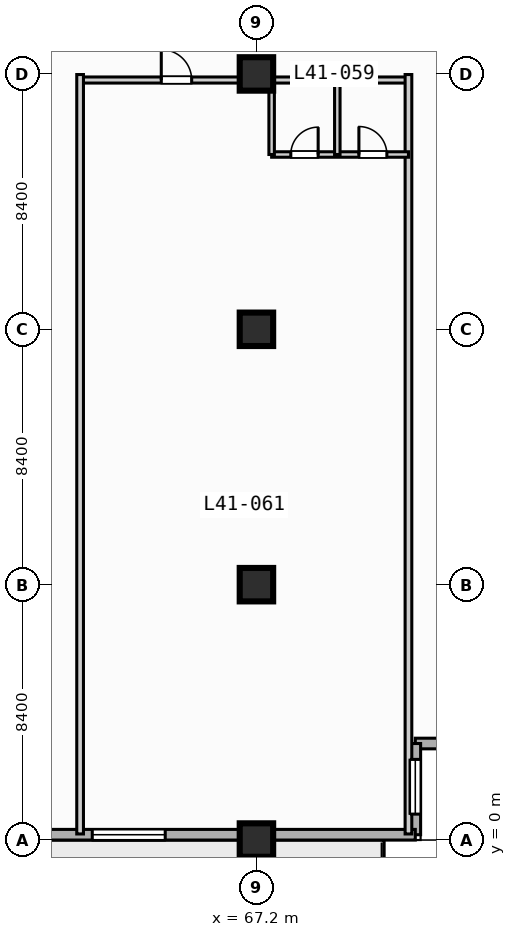
"""IFC4 building model, lengths in metres.
Left out: names, types, materials, properties, quantities, classifications, styles, units other than length and angle.
Written with IfcOpenShell. Run it as: python <this file> out.ifc"""

import sys

from ifc_helpers import new_model, si_unit, direction, frame, frame_2d, origin, origin_2d, place, context, subcontext, project, spatial, rectangle, extrude, element, fill, save


model = new_model("IFC4")
c1 = context("Model", 3, precision=1e-05, world=origin(), true_north=direction((0.0, 1.0)))
c2 = subcontext(c1, "Body", "Model", "MODEL_VIEW")
j1 = project(units=[si_unit("LENGTHUNIT", "METRE"), si_unit("PLANEANGLEUNIT", "RADIAN")], contexts=[c1])
p1 = place(None, origin())
s1 = spatial("IfcSite", under=j1, at=p1, CompositionType="ELEMENT")
p2 = place(p1, origin())
s2 = spatial("IfcBuilding", under=s1, at=p2, CompositionType="ELEMENT")
p3 = place(p2, frame((0.0, 0.0, 171.7)))
s3 = spatial("IfcBuildingStorey", under=s2, at=p3, CompositionType="ELEMENT", Elevation=171.7)
for number, where, z_axis, x_axis in (
    (1, (67.2, 0.0, 0.0), (0.0, 0.0, 1.0), (1.0, 0.0, 0.0)),
    (2, (67.2, 8.4, 0.0), (0.0, 0.0, 1.0), (1.0, 0.0, 0.0)),
    (3, (67.2, 16.8, 0.0), (0.0, 0.0, 1.0), (1.0, 0.0, 0.0)),
    (4, (67.2, 25.2, 0.0), (0.0, 0.0, 1.0), (1.0, 0.0, 0.0)),
):
    element("IfcColumn", number, at=place(p3, frame(where, z_axis=z_axis, x_axis=x_axis)), inside=s3, PredefinedType="COLUMN", context=c2, shape_type="SweptSolid", body=[
        extrude(rectangle(XDim=1.1, YDim=1.1, at=origin_2d()), origin(), (0.0, 0.0, 1.0), 3.7),
    ])
p4 = place(p3, frame((75.425, 3.175, 0.0), z_axis=(0.0, 0.0, 1.0), x_axis=(-1.0, 0.0, 0.0)))
e5 = element("IfcWall", 5, at=p4, inside=s3, PredefinedType="STANDARD", context=c2, shape_type="SweptSolid", body=[
    extrude(rectangle(XDim=3.0, YDim=0.35, at=frame_2d((1.5, 0.0))), origin(), (0.0, 0.0, 1.0), 3.47),
])
p5 = place(p3, frame((72.425, 3.175, 0.0), z_axis=(0.0, 0.0, 1.0), x_axis=(0.0, -1.0, 0.0)))
e6 = element("IfcWall", 6, at=p5, inside=s3, PredefinedType="STANDARD", context=c2, shape_type="SweptSolid", body=[
    extrude(rectangle(XDim=3.0, YDim=0.35, at=frame_2d((1.5, 0.0))), origin(), (0.0, 0.0, 1.0), 3.47),
])
p6 = place(p5, frame((0.522, 0.0, 0.85)))
e7 = element("IfcOpeningElement", 7, at=p6, cuts=e6, PredefinedType="OPENING", context=c2, shape_type="SweptSolid", body=[
    extrude(rectangle(XDim=1.8, YDim=1.8, at=frame_2d((0.9, 0.9))), frame((0.0, 0.185, 0.0), z_axis=(0.0, -1.0, 0.0), x_axis=(1.0, 0.0, 0.0)), (0.0, 0.0, 1.0), 0.37),
])
p7 = place(p3, frame((72.425, 0.175, 0.0), z_axis=(0.0, 0.0, 1.0), x_axis=(-1.0, 0.0, 0.0)))
e8 = element("IfcWall", 8, at=p7, inside=s3, PredefinedType="STANDARD", context=c2, shape_type="SweptSolid", body=[
    extrude(rectangle(XDim=69.25, YDim=0.35, at=frame_2d((34.625, 0.0))), origin(), (0.0, 0.0, 1.0), 3.47),
])
p8 = place(p7, frame((51.725, 0.0, 0.0)))
e9 = element("IfcOpeningElement", 9, at=p8, cuts=e8, PredefinedType="OPENING", context=c2, shape_type="SweptSolid", body=[
    extrude(rectangle(XDim=1.4, YDim=2.2, at=frame_2d((0.7, 1.1))), frame((0.0, 0.185, 0.0), z_axis=(0.0, -1.0, 0.0), x_axis=(1.0, 0.0, 0.0)), (0.0, 0.0, 1.0), 0.37),
])
p9 = place(p7, frame((33.725, 0.0, 0.85)))
e10 = element("IfcOpeningElement", 10, at=p9, cuts=e8, PredefinedType="OPENING", context=c2, shape_type="SweptSolid", body=[
    extrude(rectangle(XDim=1.8, YDim=1.8, at=frame_2d((0.9, 0.9))), frame((0.0, 0.185, 0.0), z_axis=(0.0, -1.0, 0.0), x_axis=(1.0, 0.0, 0.0)), (0.0, 0.0, 1.0), 0.37),
])
p10 = place(p7, frame((25.025, 0.0, 0.85)))
e11 = element("IfcOpeningElement", 11, at=p10, cuts=e8, PredefinedType="OPENING", context=c2, shape_type="SweptSolid", body=[
    extrude(rectangle(XDim=2.4, YDim=1.95, at=frame_2d((1.2, 0.975))), frame((0.0, 0.185, 0.0), z_axis=(0.0, -1.0, 0.0), x_axis=(1.0, 0.0, 0.0)), (0.0, 0.0, 1.0), 0.37),
])
p11 = place(p7, frame((8.225, 0.0, 0.85)))
e12 = element("IfcOpeningElement", 12, at=p11, cuts=e8, PredefinedType="OPENING", context=c2, shape_type="SweptSolid", body=[
    extrude(rectangle(XDim=2.4, YDim=1.95, at=frame_2d((1.2, 0.975))), frame((0.0, 0.185, 0.0), z_axis=(0.0, -1.0, 0.0), x_axis=(1.0, 0.0, 0.0)), (0.0, 0.0, 1.0), 0.37),
])
p12 = place(p7, frame((64.725, 0.0, 0.85)))
e13 = element("IfcOpeningElement", 13, at=p12, cuts=e8, PredefinedType="OPENING", context=c2, shape_type="SweptSolid", body=[
    extrude(rectangle(XDim=1.8, YDim=1.8, at=frame_2d((0.9, 0.9))), frame((0.0, 0.185, 0.0), z_axis=(0.0, -1.0, 0.0), x_axis=(1.0, 0.0, 0.0)), (0.0, 0.0, 1.0), 0.37),
])
p13 = place(p7, frame((44.675, 0.0, 0.85)))
e14 = element("IfcOpeningElement", 14, at=p13, cuts=e8, PredefinedType="OPENING", context=c2, shape_type="SweptSolid", body=[
    extrude(rectangle(XDim=1.8, YDim=1.8, at=frame_2d((0.9, 0.9))), frame((0.0, 0.185, 0.0), z_axis=(0.0, -1.0, 0.0), x_axis=(1.0, 0.0, 0.0)), (0.0, 0.0, 1.0), 0.37),
])
p14 = place(p3, frame((61.4, 25.0, 0.0), z_axis=(0.0, 0.0, 1.0), x_axis=(1.0, 0.0, 0.0)))
e15 = element("IfcWall", 15, at=p14, inside=s3, PredefinedType="PARTITIONING", context=c2, shape_type="SweptSolid", body=[
    extrude(rectangle(XDim=10.8, YDim=0.2, at=frame_2d((5.4, 0.0))), origin(), (0.0, 0.0, 1.0), 2.82),
])
p15 = place(p14, frame((2.67, 0.0, 0.0)))
e16 = element("IfcOpeningElement", 16, at=p15, cuts=e15, PredefinedType="OPENING", context=c2, shape_type="SweptSolid", body=[
    extrude(rectangle(XDim=1.0, YDim=2.15, at=frame_2d((0.5, 1.075))), frame((0.0, 0.11, 0.0), z_axis=(0.0, -1.0, 0.0), x_axis=(1.0, 0.0, 0.0)), (0.0, 0.0, 1.0), 0.22),
])
for number, where, z_axis, x_axis in (
    (17, (61.4, 0.2, 0.0), (0.0, 0.0, 1.0), (0.0, 1.0, 0.0)),
    (18, (72.2, 0.2, 0.0), (0.0, 0.0, 1.0), (0.0, 1.0, 0.0)),
):
    element("IfcWall", number, at=place(p3, frame(where, z_axis=z_axis, x_axis=x_axis)), inside=s3, PredefinedType="PARTITIONING", context=c2, shape_type="SweptSolid", body=[
        extrude(rectangle(XDim=24.98, YDim=0.22, at=frame_2d((12.49, 0.0))), origin(), (0.0, 0.0, 1.0), 3.47),
    ])
p16 = place(p3, frame((67.7, 22.55, 0.0), z_axis=(0.0, 0.0, 1.0), x_axis=(1.0, 0.0, 0.0)))
e19 = element("IfcWall", 19, at=p16, inside=s3, PredefinedType="PLUMBINGWALL", context=c2, shape_type="SweptSolid", body=[
    extrude(rectangle(XDim=4.5, YDim=0.18, at=frame_2d((2.25, 0.0))), origin(), (0.0, 0.0, 1.0), 3.47),
])
p17 = place(p16, frame((0.63, 0.0, 0.0)))
e20 = element("IfcOpeningElement", 20, at=p17, cuts=e19, PredefinedType="OPENING", context=c2, shape_type="SweptSolid", body=[
    extrude(rectangle(XDim=0.9, YDim=2.1, at=frame_2d((0.45, 1.05))), frame((0.0, 0.1, 0.0), z_axis=(0.0, -1.0, 0.0), x_axis=(1.0, 0.0, 0.0)), (0.0, 0.0, 1.0), 0.2),
])
p18 = place(p16, frame((2.87, 0.0, 0.0)))
e21 = element("IfcOpeningElement", 21, at=p18, cuts=e19, PredefinedType="OPENING", context=c2, shape_type="SweptSolid", body=[
    extrude(rectangle(XDim=0.92, YDim=2.1, at=frame_2d((0.46, 1.05))), frame((0.0, 0.1, 0.0), z_axis=(0.0, -1.0, 0.0), x_axis=(1.0, 0.0, 0.0)), (0.0, 0.0, 1.0), 0.2),
])
for number, where, z_axis, x_axis in (
    (22, (67.7, 22.55, 0.0), (0.0, 0.0, 1.0), (0.0, 1.0, 0.0)),
    (23, (69.86, 22.55, 0.0), (0.0, 0.0, 1.0), (0.0, 1.0, 0.0)),
):
    element("IfcWall", number, at=place(p3, frame(where, z_axis=z_axis, x_axis=x_axis)), inside=s3, PredefinedType="PLUMBINGWALL", context=c2, shape_type="SweptSolid", body=[
        extrude(rectangle(XDim=2.45, YDim=0.18, at=frame_2d((1.225, 0.0))), origin(), (0.0, 0.0, 1.0), 3.47),
    ])
p19 = place(p6, origin())
e24 = element("IfcWindow", 24, at=p19, inside=s3, PartitioningType="SINGLE_PANEL", PredefinedType="WINDOW", context=c2, shape_type="SweptSolid", body=[
    extrude(rectangle(XDim=1.8, YDim=1.8, at=frame_2d((0.9, 0.9))), frame((0.0, 0.03, 0.0), z_axis=(0.0, -1.0, 0.0), x_axis=(1.0, 0.0, 0.0)), (0.0, 0.0, 1.0), 0.06),
])
fill(e7, e24)
p20 = place(p11, origin())
e25 = element("IfcWindow", 25, at=p20, inside=s3, PartitioningType="SINGLE_PANEL", PredefinedType="WINDOW", context=c2, shape_type="SweptSolid", body=[
    extrude(rectangle(XDim=2.4, YDim=1.95, at=frame_2d((1.2, 0.975))), frame((0.0, 0.03, 0.0), z_axis=(0.0, -1.0, 0.0), x_axis=(1.0, 0.0, 0.0)), (0.0, 0.0, 1.0), 0.06),
])
fill(e12, e25)
p21 = place(p15, origin())
e26 = element("IfcDoor", 26, at=p21, inside=s3, OperationType="SINGLE_SWING_LEFT", PredefinedType="DOOR", context=c2, shape_type="SweptSolid", body=[
    extrude(rectangle(XDim=1.0, YDim=2.15, at=frame_2d((0.5, 1.075))), frame((0.0, 0.025, 0.0), z_axis=(0.0, -1.0, 0.0), x_axis=(1.0, 0.0, 0.0)), (0.0, 0.0, 1.0), 0.05),
])
fill(e16, e26)
p22 = place(p17, origin())
e27 = element("IfcDoor", 27, at=p22, inside=s3, OperationType="SINGLE_SWING_RIGHT", PredefinedType="DOOR", context=c2, shape_type="SweptSolid", body=[
    extrude(rectangle(XDim=0.9, YDim=2.1, at=frame_2d((0.45, 1.05))), frame((0.0, 0.025, 0.0), z_axis=(0.0, -1.0, 0.0), x_axis=(1.0, 0.0, 0.0)), (0.0, 0.0, 1.0), 0.05),
])
fill(e20, e27)
p23 = place(p18, origin())
e28 = element("IfcDoor", 28, at=p23, inside=s3, OperationType="SINGLE_SWING_LEFT", PredefinedType="DOOR", context=c2, shape_type="SweptSolid", body=[
    extrude(rectangle(XDim=0.92, YDim=2.1, at=frame_2d((0.46, 1.05))), frame((0.0, 0.025, 0.0), z_axis=(0.0, -1.0, 0.0), x_axis=(1.0, 0.0, 0.0)), (0.0, 0.0, 1.0), 0.05),
])
fill(e21, e28)
save(model, sys.argv[1])
